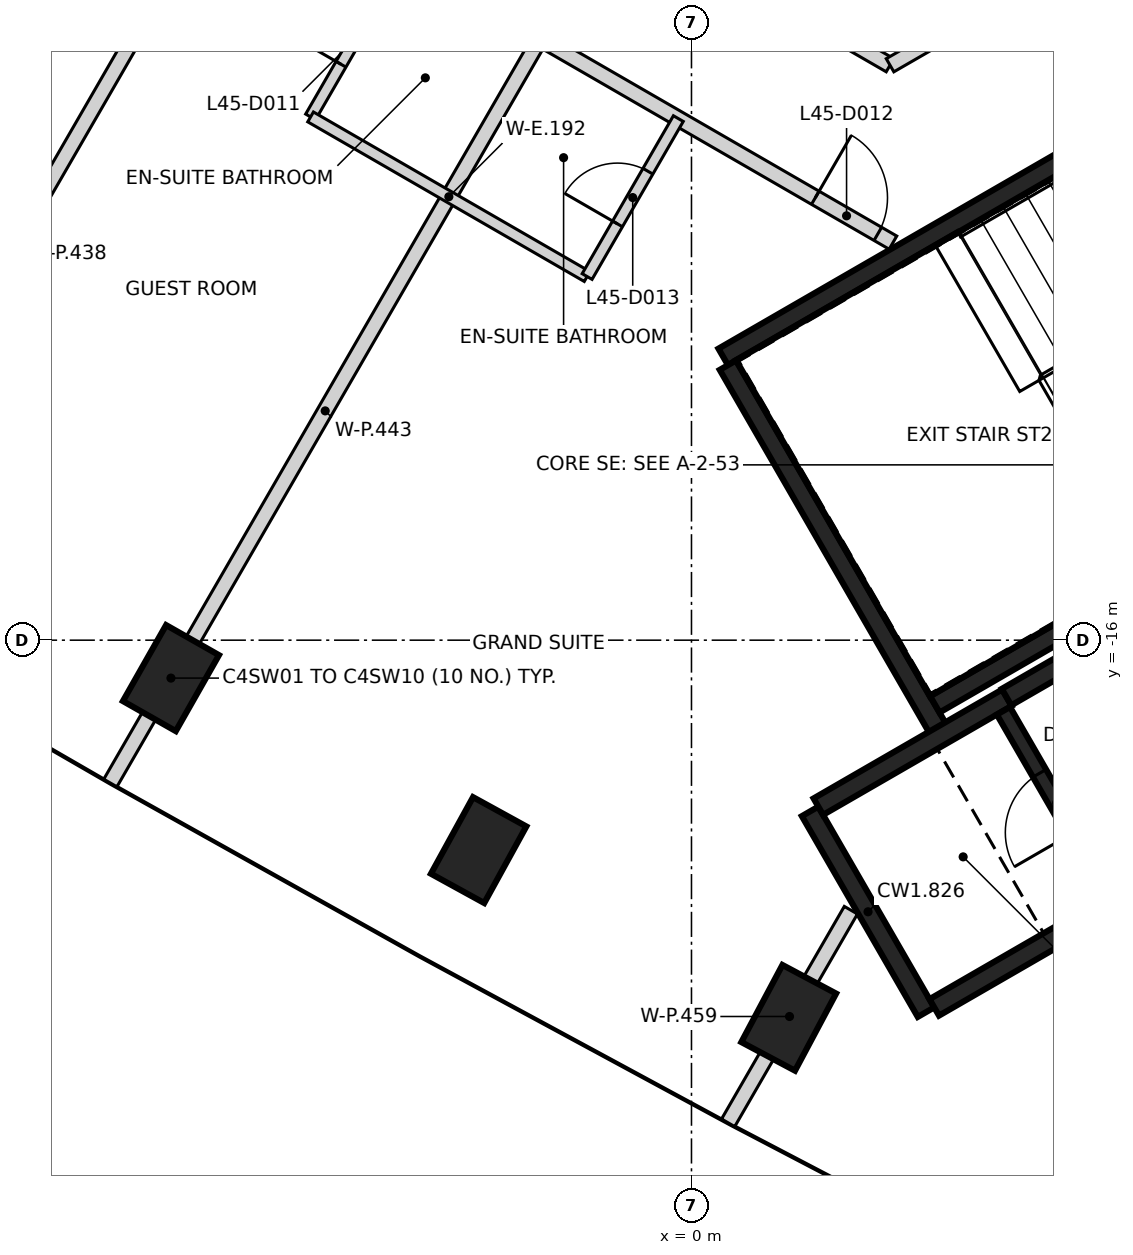
"""IFC4 building model, lengths in metres.
Left out: names, types, materials, properties, quantities, classifications, styles, units other than length and angle.
Written with IfcOpenShell. Run it as: python <this file> out.ifc"""

import sys

from ifc_helpers import new_model, si_unit, direction, frame, frame_2d, origin, origin_2d, place, context, subcontext, project, spatial, rectangle, extrude, element, fill, save


model = new_model("IFC4")
c1 = context("Model", 3, precision=1e-05, world=origin(), true_north=direction((0.0, 1.0)))
c2 = subcontext(c1, "Body", "Model", "MODEL_VIEW")
j1 = project(units=[si_unit("LENGTHUNIT", "METRE"), si_unit("PLANEANGLEUNIT", "RADIAN")], contexts=[c1])
p1 = place(None, origin())
s1 = spatial("IfcSite", under=j1, at=p1, CompositionType="ELEMENT")
p2 = place(p1, origin())
s2 = spatial("IfcBuilding", under=s1, at=p2, CompositionType="ELEMENT")
p3 = place(p2, frame((0.0, 0.0, 182.8)))
s3 = spatial("IfcBuildingStorey", under=s2, at=p3, CompositionType="ELEMENT", Elevation=182.8)
for number, where, z_axis, x_axis in (
    (1, (-6.848, -16.499, -0.35), (0.0, 0.0, 1.0), (0.494, 0.87, 0.0)),
    (2, (-2.8, -18.762, -0.35), (0.0, 0.0, 1.0), (0.482, 0.876, 0.0)),
    (3, (1.279, -20.968, -0.35), (0.0, 0.0, 1.0), (0.47, 0.883, 0.0)),
):
    element("IfcColumn", number, at=place(p3, frame(where, z_axis=z_axis, x_axis=x_axis)), inside=s3, PredefinedType="COLUMN", context=c2, shape_type="SweptSolid", body=[
        extrude(rectangle(XDim=1.15, YDim=0.8, at=origin_2d()), origin(), (0.0, 0.0, 1.0), 3.6),
    ])
p4 = place(p3, frame((0.417, -12.273, 0.0), z_axis=(0.0, 0.0, 1.0), x_axis=(0.866021906294, 0.500006057782, 0.0)))
e4 = element("IfcWall", 4, at=p4, inside=s3, PredefinedType="SHEAR", context=c2, shape_type="SweptSolid", body=[
    extrude(rectangle(XDim=11.55, YDim=0.25, at=frame_2d((5.775, 0.0))), origin(), (0.0, 0.0, 1.0), 3.25),
])
p5 = place(p4, frame((10.025, 0.0, 0.0)))
e5 = element("IfcOpeningElement", 5, at=p5, cuts=e4, PredefinedType="OPENING", context=c2, shape_type="SweptSolid", body=[
    extrude(rectangle(XDim=1.2, YDim=2.1, at=frame_2d((0.6, 1.05))), frame((0.0, 0.135, 0.0), z_axis=(0.0, -1.0, 0.0), x_axis=(1.0, 0.0, 0.0)), (0.0, 0.0, 1.0), 0.27),
])
p6 = place(p4, frame((8.725, 0.0, 0.0)))
e6 = element("IfcOpeningElement", 6, at=p6, cuts=e4, PredefinedType="OPENING", context=c2, shape_type="SweptSolid", body=[
    extrude(rectangle(XDim=1.2, YDim=2.1, at=frame_2d((0.6, 1.05))), frame((0.0, 0.135, 0.0), z_axis=(0.0, -1.0, 0.0), x_axis=(1.0, 0.0, 0.0)), (0.0, 0.0, 1.0), 0.27),
])
p7 = place(p3, frame((3.235, -17.153, 0.0), z_axis=(0.0, 0.0, 1.0), x_axis=(-0.500008851346, 0.866020293397, 0.0)))
e7 = element("IfcWall", 7, at=p7, inside=s3, PredefinedType="SHEAR", context=c2, shape_type="SweptSolid", body=[
    extrude(rectangle(XDim=5.51, YDim=0.25, at=frame_2d((2.755, 0.0))), origin(), (0.0, 0.0, 1.0), 3.25),
])
p8 = place(p3, frame((3.085, -20.894, 0.0), z_axis=(0.0, 0.0, 1.0), x_axis=(-0.499978833458, 0.866037623948, 0.0)))
e8 = element("IfcWall", 8, at=p8, inside=s3, PredefinedType="SHEAR", context=c2, shape_type="SweptSolid", body=[
    extrude(rectangle(XDim=3.05, YDim=0.25, at=frame_2d((1.525, 0.0))), origin(), (0.0, 0.0, 1.0), 3.25),
])
p9 = place(p3, frame((1.669, -18.19, 0.0), z_axis=(0.0, 0.0, 1.0), x_axis=(0.866042235819, 0.499970844928, 0.0)))
e9 = element("IfcWall", 9, at=p9, inside=s3, PredefinedType="SHEAR", context=c2, shape_type="SweptSolid", body=[
    extrude(rectangle(XDim=2.865, YDim=0.25, at=frame_2d((1.432, 0.0))), origin(), (0.0, 0.0, 1.0), 3.25),
])
p10 = place(p3, frame((5.675, -19.399, 0.0), z_axis=(0.0, 0.0, 1.0), x_axis=(-0.866026637627, -0.499997862916, 0.0)))
e10 = element("IfcWall", 10, at=p10, inside=s3, PredefinedType="SHEAR", context=c2, shape_type="SweptSolid", body=[
    extrude(rectangle(XDim=2.865, YDim=0.25, at=frame_2d((1.432, 0.0))), origin(), (0.0, 0.0, 1.0), 3.25),
])
p11 = place(p3, frame((5.431, -15.556, 0.0), z_axis=(0.0, 0.0, 1.0), x_axis=(-0.866022940537, -0.500004266446, 0.0)))
e11 = element("IfcWall", 11, at=p11, inside=s3, PredefinedType="SHEAR", context=c2, shape_type="SweptSolid", body=[
    extrude(rectangle(XDim=2.575, YDim=0.25, at=frame_2d((1.287, 0.0))), origin(), (0.0, 0.0, 1.0), 3.25),
])
p12 = place(p3, frame((4.145, -16.749, 0.0), z_axis=(0.0, 0.0, 1.0), x_axis=(0.866038183914, 0.499977863513, 0.0)))
e12 = element("IfcWall", 12, at=p12, inside=s3, PredefinedType="SHEAR", context=c2, shape_type="SweptSolid", body=[
    extrude(rectangle(XDim=1.71, YDim=0.25, at=frame_2d((0.855, 0.0))), origin(), (0.0, 0.0, 1.0), 3.25),
])
p13 = place(p3, frame((5.503, -19.352, 0.0), z_axis=(0.0, 0.0, 1.0), x_axis=(-0.499986818241, 0.866033014143, 0.0)))
e13 = element("IfcWall", 13, at=p13, inside=s3, PredefinedType="SHEAR", context=c2, shape_type="SweptSolid", body=[
    extrude(rectangle(XDim=2.798, YDim=0.2, at=frame_2d((1.399, 0.0))), origin(), (0.0, 0.0, 1.0), 3.25),
])
p14 = place(p13, frame((0.949, 0.0, 0.0)))
e14 = element("IfcOpeningElement", 14, at=p14, cuts=e13, PredefinedType="OPENING", context=c2, shape_type="SweptSolid", body=[
    extrude(rectangle(XDim=0.9, YDim=2.1, at=frame_2d((0.45, 1.05))), frame((0.0, 0.11, 0.0), z_axis=(0.0, -1.0, 0.0), x_axis=(1.0, 0.0, 0.0)), (0.0, 0.0, 1.0), 0.22),
])
p15 = place(p3, frame((-8.612, -1.956, 0.0), z_axis=(0.0, 0.0, 1.0), x_axis=(0.866034386606, -0.499984440973, 0.0)))
e15 = element("IfcWall", 15, at=p15, inside=s3, PredefinedType="PARTITIONING", context=c2, shape_type="SweptSolid", body=[
    extrude(rectangle(XDim=12.96, YDim=0.2, at=frame_2d((6.48, 0.0))), origin(), (0.0, 0.0, 1.0), 3.25),
])
p16 = place(p15, frame((3.955, 0.0, 0.0)))
e16 = element("IfcOpeningElement", 16, at=p16, cuts=e15, PredefinedType="OPENING", context=c2, shape_type="SweptSolid", body=[
    extrude(rectangle(XDim=0.9, YDim=2.1, at=frame_2d((0.45, 1.05))), frame((0.0, 0.11, 0.0), z_axis=(0.0, -1.0, 0.0), x_axis=(1.0, 0.0, 0.0)), (0.0, 0.0, 1.0), 0.22),
])
p17 = place(p15, frame((10.424, 0.0, 0.0)))
e17 = element("IfcOpeningElement", 17, at=p17, cuts=e15, PredefinedType="OPENING", context=c2, shape_type="SweptSolid", body=[
    extrude(rectangle(XDim=0.9, YDim=2.1, at=frame_2d((0.45, 1.05))), frame((0.0, 0.11, 0.0), z_axis=(0.0, -1.0, 0.0), x_axis=(1.0, 0.0, 0.0)), (0.0, 0.0, 1.0), 0.22),
])
p18 = place(p3, frame((-8.301, -4.445, 0.0), z_axis=(0.0, 0.0, 1.0), x_axis=(0.865969859016, -0.500096194023, 0.0)))
e18 = element("IfcWall", 18, at=p18, inside=s3, PredefinedType="PARTITIONING", context=c2, shape_type="SweptSolid", body=[
    extrude(rectangle(XDim=12.647, YDim=0.2, at=frame_2d((6.323, 0.0))), origin(), (0.0, 0.0, 1.0), 3.25),
])
p19 = place(p18, frame((2.836, 0.0, 0.0)))
e19 = element("IfcOpeningElement", 19, at=p19, cuts=e18, PredefinedType="OPENING", context=c2, shape_type="SweptSolid", body=[
    extrude(rectangle(XDim=0.95, YDim=2.1, at=frame_2d((0.475, 1.05))), frame((0.0, 0.11, 0.0), z_axis=(0.0, -1.0, 0.0), x_axis=(1.0, 0.0, 0.0)), (0.0, 0.0, 1.0), 0.22),
])
p20 = place(p18, frame((11.467, 0.0, 0.0)))
e20 = element("IfcOpeningElement", 20, at=p20, cuts=e18, PredefinedType="OPENING", context=c2, shape_type="SweptSolid", body=[
    extrude(rectangle(XDim=0.95, YDim=2.1, at=frame_2d((0.475, 1.05))), frame((0.0, 0.11, 0.0), z_axis=(0.0, -1.0, 0.0), x_axis=(1.0, 0.0, 0.0)), (0.0, 0.0, 1.0), 0.22),
])
p21 = place(p3, frame((2.612, -8.437, 0.0), z_axis=(0.0, 0.0, 1.0), x_axis=(0.866026830048, 0.499997529631, 0.0)))
e21 = element("IfcWall", 21, at=p21, inside=s3, PredefinedType="PARTITIONING", context=c2, shape_type="SweptSolid", body=[
    extrude(rectangle(XDim=0.973, YDim=0.2, at=frame_2d((0.487, 0.0))), origin(), (0.0, 0.0, 1.0), 3.25),
])
p22 = place(p3, frame((-11.661, -15.561, 0.0), z_axis=(0.0, 0.0, 1.0), x_axis=(0.500012795616, 0.866018016106, 0.0)))
e22 = element("IfcWall", 22, at=p22, inside=s3, PredefinedType="PARTITIONING", context=c2, shape_type="SweptSolid", body=[
    extrude(rectangle(XDim=11.306, YDim=0.2, at=frame_2d((5.653, 0.0))), origin(), (0.0, 0.0, 1.0), 3.25),
])
p23 = place(p3, frame((-7.646, -17.879, 0.0), z_axis=(0.0, 0.0, 1.0), x_axis=(0.500031496802, 0.866007218334, 0.0)))
e23 = element("IfcWall", 23, at=p23, inside=s3, PredefinedType="PARTITIONING", context=c2, shape_type="SweptSolid", body=[
    extrude(rectangle(XDim=11.306, YDim=0.2, at=frame_2d((5.653, 0.0))), origin(), (0.0, 0.0, 1.0), 3.25),
])
p24 = place(p3, frame((0.482, -22.349, 0.0), z_axis=(0.0, 0.0, 1.0), x_axis=(0.500016891966, 0.866015650984, 0.0)))
e24 = element("IfcWall", 24, at=p24, inside=s3, PredefinedType="PARTITIONING", context=c2, shape_type="SweptSolid", body=[
    extrude(rectangle(XDim=3.23, YDim=0.2, at=frame_2d((1.615, 0.0))), origin(), (0.0, 0.0, 1.0), 3.25),
])
p25 = place(p3, frame((-5.011, -9.116, 0.0), z_axis=(0.0, 0.0, 1.0), x_axis=(0.500089422704, 0.865973769406, 0.0)))
e25 = element("IfcWall", 25, at=p25, inside=s3, PredefinedType="PARTITIONING", context=c2, shape_type="SweptSolid", body=[
    extrude(rectangle(XDim=2.399, YDim=0.15, at=frame_2d((1.2, 0.0))), origin(), (0.0, 0.0, 1.0), 3.25),
])
p26 = place(p25, frame((0.8, 0.0, 0.0)))
e26 = element("IfcOpeningElement", 26, at=p26, cuts=e25, PredefinedType="OPENING", context=c2, shape_type="SweptSolid", body=[
    extrude(rectangle(XDim=0.8, YDim=2.1, at=frame_2d((0.4, 1.05))), frame((0.0, 0.085, 0.0), z_axis=(0.0, -1.0, 0.0), x_axis=(1.0, 0.0, 0.0)), (0.0, 0.0, 1.0), 0.17),
])
p27 = place(p3, frame((-5.011, -9.116, 0.0), z_axis=(0.0, 0.0, 1.0), x_axis=(0.866052994476, -0.499952208475, 0.0)))
e27 = element("IfcWall", 27, at=p27, inside=s3, PredefinedType="PARTITIONING", context=c2, shape_type="SweptSolid", body=[
    extrude(rectangle(XDim=4.201, YDim=0.15, at=frame_2d((2.1, 0.0))), origin(), (0.0, 0.0, 1.0), 3.25),
])
p28 = place(p3, frame((-1.373, -11.216, 0.0), z_axis=(0.0, 0.0, 1.0), x_axis=(0.500045362686, 0.865999212041, 0.0)))
e28 = element("IfcWall", 28, at=p28, inside=s3, PredefinedType="PARTITIONING", context=c2, shape_type="SweptSolid", body=[
    extrude(rectangle(XDim=2.4, YDim=0.15, at=frame_2d((1.2, 0.0))), origin(), (0.0, 0.0, 1.0), 3.25),
])
p29 = place(p28, frame((0.8, 0.0, 0.0)))
e29 = element("IfcOpeningElement", 29, at=p29, cuts=e28, PredefinedType="OPENING", context=c2, shape_type="SweptSolid", body=[
    extrude(rectangle(XDim=0.8, YDim=2.1, at=frame_2d((0.4, 1.05))), frame((0.0, 0.085, 0.0), z_axis=(0.0, -1.0, 0.0), x_axis=(1.0, 0.0, 0.0)), (0.0, 0.0, 1.0), 0.17),
])
p30 = place(p14, origin())
e30 = element("IfcDoor", 30, at=p30, inside=s3, OperationType="SINGLE_SWING_RIGHT", PredefinedType="DOOR", context=c2, shape_type="SweptSolid", body=[
    extrude(rectangle(XDim=0.9, YDim=2.1, at=frame_2d((0.45, 1.05))), frame((0.0, 0.025, 0.0), z_axis=(0.0, -1.0, 0.0), x_axis=(1.0, 0.0, 0.0)), (0.0, 0.0, 1.0), 0.05),
])
fill(e14, e30)
p31 = place(p26, origin())
e31 = element("IfcDoor", 31, at=p31, inside=s3, OperationType="SINGLE_SWING_LEFT", PredefinedType="DOOR", context=c2, shape_type="SweptSolid", body=[
    extrude(rectangle(XDim=0.8, YDim=2.1, at=frame_2d((0.4, 1.05))), frame((0.0, 0.025, 0.0), z_axis=(0.0, -1.0, 0.0), x_axis=(1.0, 0.0, 0.0)), (0.0, 0.0, 1.0), 0.05),
])
fill(e26, e31)
p32 = place(p20, frame((0.95, 0.0, 0.0), z_axis=(0.0, 0.0, 1.0), x_axis=(-1.0, 0.0, 0.0)))
e32 = element("IfcDoor", 32, at=p32, inside=s3, OperationType="SINGLE_SWING_LEFT", PredefinedType="DOOR", context=c2, shape_type="SweptSolid", body=[
    extrude(rectangle(XDim=0.95, YDim=2.1, at=frame_2d((0.475, 1.05))), frame((0.0, 0.025, 0.0), z_axis=(0.0, -1.0, 0.0), x_axis=(1.0, 0.0, 0.0)), (0.0, 0.0, 1.0), 0.05),
])
fill(e20, e32)
p33 = place(p29, frame((0.8, 0.0, 0.0), z_axis=(0.0, 0.0, 1.0), x_axis=(-1.0, 0.0, 0.0)))
e33 = element("IfcDoor", 33, at=p33, inside=s3, OperationType="SINGLE_SWING_LEFT", PredefinedType="DOOR", context=c2, shape_type="SweptSolid", body=[
    extrude(rectangle(XDim=0.8, YDim=2.1, at=frame_2d((0.4, 1.05))), frame((0.0, 0.025, 0.0), z_axis=(0.0, -1.0, 0.0), x_axis=(1.0, 0.0, 0.0)), (0.0, 0.0, 1.0), 0.05),
])
fill(e29, e33)
save(model, sys.argv[1])
